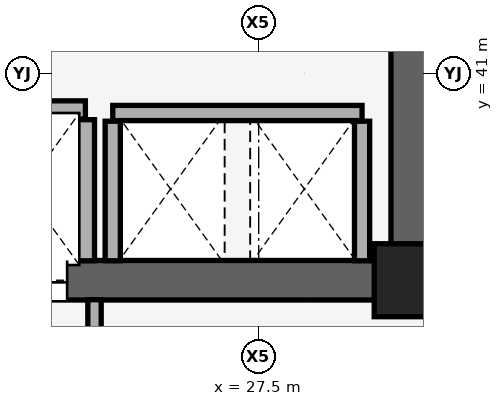
"""IFC4 building model, lengths in metres.
Left out: names, types, materials, properties, quantities, classifications, styles, units other than length and angle.
Written with IfcOpenShell. Run it as: python <this file> out.ifc"""

import sys

from ifc_helpers import new_model, si_unit, direction, frame, frame_2d, origin, origin_2d, place, context, subcontext, project, spatial, rectangle, extrude, element, fill, save


model = new_model("IFC4")
c1 = context("Model", 3, precision=1e-05, world=origin(), true_north=direction((0.0, 1.0)))
c2 = subcontext(c1, "Body", "Model", "MODEL_VIEW")
j1 = project(units=[si_unit("LENGTHUNIT", "METRE"), si_unit("PLANEANGLEUNIT", "RADIAN")], contexts=[c1])
p1 = place(None, origin())
s1 = spatial("IfcSite", under=j1, at=p1, CompositionType="ELEMENT")
p2 = place(p1, origin())
s2 = spatial("IfcBuilding", under=s1, at=p2, CompositionType="ELEMENT")
p3 = place(p2, frame((0.0, 0.0, 81.8)))
s3 = spatial("IfcBuildingStorey", under=s2, at=p3, CompositionType="ELEMENT", Elevation=81.8)
p4 = place(p3, frame((30.0, 37.6, 0.0), z_axis=(0.0, 0.0, 1.0), x_axis=(1.0, 0.0, 0.0)))
e1 = element("IfcColumn", 1, at=p4, inside=s3, PredefinedType="COLUMN", context=c2, shape_type="SweptSolid", body=[
    extrude(rectangle(XDim=1.2, YDim=1.2, at=origin_2d()), origin(), (0.0, 0.0, 1.0), 6.6),
])
p5 = place(p3, frame((30.0, 37.6, 0.0), z_axis=(0.0, 0.0, 1.0), x_axis=(0.0, 1.0, 0.0)))
e2 = element("IfcWall", 2, at=p5, inside=s3, PredefinedType="SHEAR", context=c2, shape_type="SweptSolid", body=[
    extrude(rectangle(XDim=6.0, YDim=0.65, at=frame_2d((3.0, 0.0))), origin(), (0.0, 0.0, 1.0), 6.38),
])
p6 = place(p3, frame((11.0, 37.6, 0.0), z_axis=(0.0, 0.0, 1.0), x_axis=(1.0, 0.0, 0.0)))
e3 = element("IfcWall", 3, at=p6, inside=s3, PredefinedType="SHEAR", context=c2, shape_type="SweptSolid", body=[
    extrude(rectangle(XDim=19.0, YDim=0.65, at=frame_2d((9.5, 0.0))), origin(), (0.0, 0.0, 1.0), 6.38),
])
p7 = place(p6, frame((1.06, 0.0, 0.0)))
e4 = element("IfcOpeningElement", 4, at=p7, cuts=e3, PredefinedType="OPENING", context=c2, shape_type="SweptSolid", body=[
    extrude(rectangle(XDim=1.15, YDim=2.2, at=frame_2d((0.575, 1.1))), frame((0.0, 0.335, 0.0), z_axis=(0.0, -1.0, 0.0), x_axis=(1.0, 0.0, 0.0)), (0.0, 0.0, 1.0), 0.67),
])
p8 = place(p6, frame((9.55, 0.0, 0.0)))
e5 = element("IfcOpeningElement", 5, at=p8, cuts=e3, PredefinedType="OPENING", context=c2, shape_type="SweptSolid", body=[
    extrude(rectangle(XDim=1.4, YDim=2.35, at=frame_2d((0.7, 1.175))), frame((0.0, 0.335, 0.0), z_axis=(0.0, -1.0, 0.0), x_axis=(1.0, 0.0, 0.0)), (0.0, 0.0, 1.0), 0.67),
])
p9 = place(p6, frame((11.95, 0.0, 0.0)))
e6 = element("IfcOpeningElement", 6, at=p9, cuts=e3, PredefinedType="OPENING", context=c2, shape_type="SweptSolid", body=[
    extrude(rectangle(XDim=1.4, YDim=2.35, at=frame_2d((0.7, 1.175))), frame((0.0, 0.335, 0.0), z_axis=(0.0, -1.0, 0.0), x_axis=(1.0, 0.0, 0.0)), (0.0, 0.0, 1.0), 0.67),
])
p10 = place(p3, frame((25.1, 40.35, 0.0), z_axis=(0.0, 0.0, 1.0), x_axis=(1.0, 0.0, 0.0)))
e7 = element("IfcWall", 7, at=p10, inside=s3, PredefinedType="SOLIDWALL", context=c2, shape_type="SweptSolid", body=[
    extrude(rectangle(XDim=4.1, YDim=0.25, at=frame_2d((2.05, 0.0))), origin(), (0.0, 0.0, 1.0), 6.38),
])
p11 = place(p3, frame((20.25, 40.4, 0.0), z_axis=(0.0, 0.0, 1.0), x_axis=(1.0, 0.0, 0.0)))
e8 = element("IfcWall", 8, at=p11, inside=s3, PredefinedType="SOLIDWALL", context=c2, shape_type="SweptSolid", body=[
    extrude(rectangle(XDim=4.4, YDim=0.3, at=frame_2d((2.2, 0.0))), origin(), (0.0, 0.0, 1.0), 6.38),
])
p12 = place(p3, frame((24.65, 37.92, 0.0), z_axis=(0.0, 0.0, 1.0), x_axis=(0.0, 1.0, 0.0)))
e9 = element("IfcWall", 9, at=p12, inside=s3, PredefinedType="SOLIDWALL", context=c2, shape_type="SweptSolid", body=[
    extrude(rectangle(XDim=2.32, YDim=0.3, at=frame_2d((1.16, 0.0))), origin(), (0.0, 0.0, 1.0), 6.38),
])
p13 = place(p3, frame((24.8, 34.57, 0.0), z_axis=(0.0, 0.0, 1.0), x_axis=(0.0, 1.0, 0.0)))
e10 = element("IfcWall", 10, at=p13, inside=s3, PredefinedType="SOLIDWALL", context=c2, shape_type="SweptSolid", body=[
    extrude(rectangle(XDim=2.71, YDim=0.22, at=frame_2d((1.355, 0.0))), origin(), (0.0, 0.0, 1.0), 6.38),
])
for number, where, z_axis, x_axis in (
    (11, (25.1, 37.92, 0.0), (0.0, 0.0, 1.0), (0.0, 1.0, 0.0)),
    (12, (29.2, 37.92, 0.0), (0.0, 0.0, 1.0), (0.0, 1.0, 0.0)),
):
    element("IfcWall", number, at=place(p3, frame(where, z_axis=z_axis, x_axis=x_axis)), inside=s3, PredefinedType="SOLIDWALL", context=c2, shape_type="SweptSolid", body=[
        extrude(rectangle(XDim=2.295, YDim=0.25, at=frame_2d((1.147, 0.0))), origin(), (0.0, 0.0, 1.0), 6.38),
    ])
p14 = place(p9, origin())
e13 = element("IfcDoor", 13, at=p14, inside=s3, OperationType="DOUBLE_DOOR_SLIDING", PredefinedType="DOOR", context=c2, shape_type="SweptSolid", body=[
    extrude(rectangle(XDim=1.4, YDim=2.35, at=frame_2d((0.7, 1.175))), frame((0.0, 0.025, 0.0), z_axis=(0.0, -1.0, 0.0), x_axis=(1.0, 0.0, 0.0)), (0.0, 0.0, 1.0), 0.05),
])
fill(e6, e13)
save(model, sys.argv[1])
